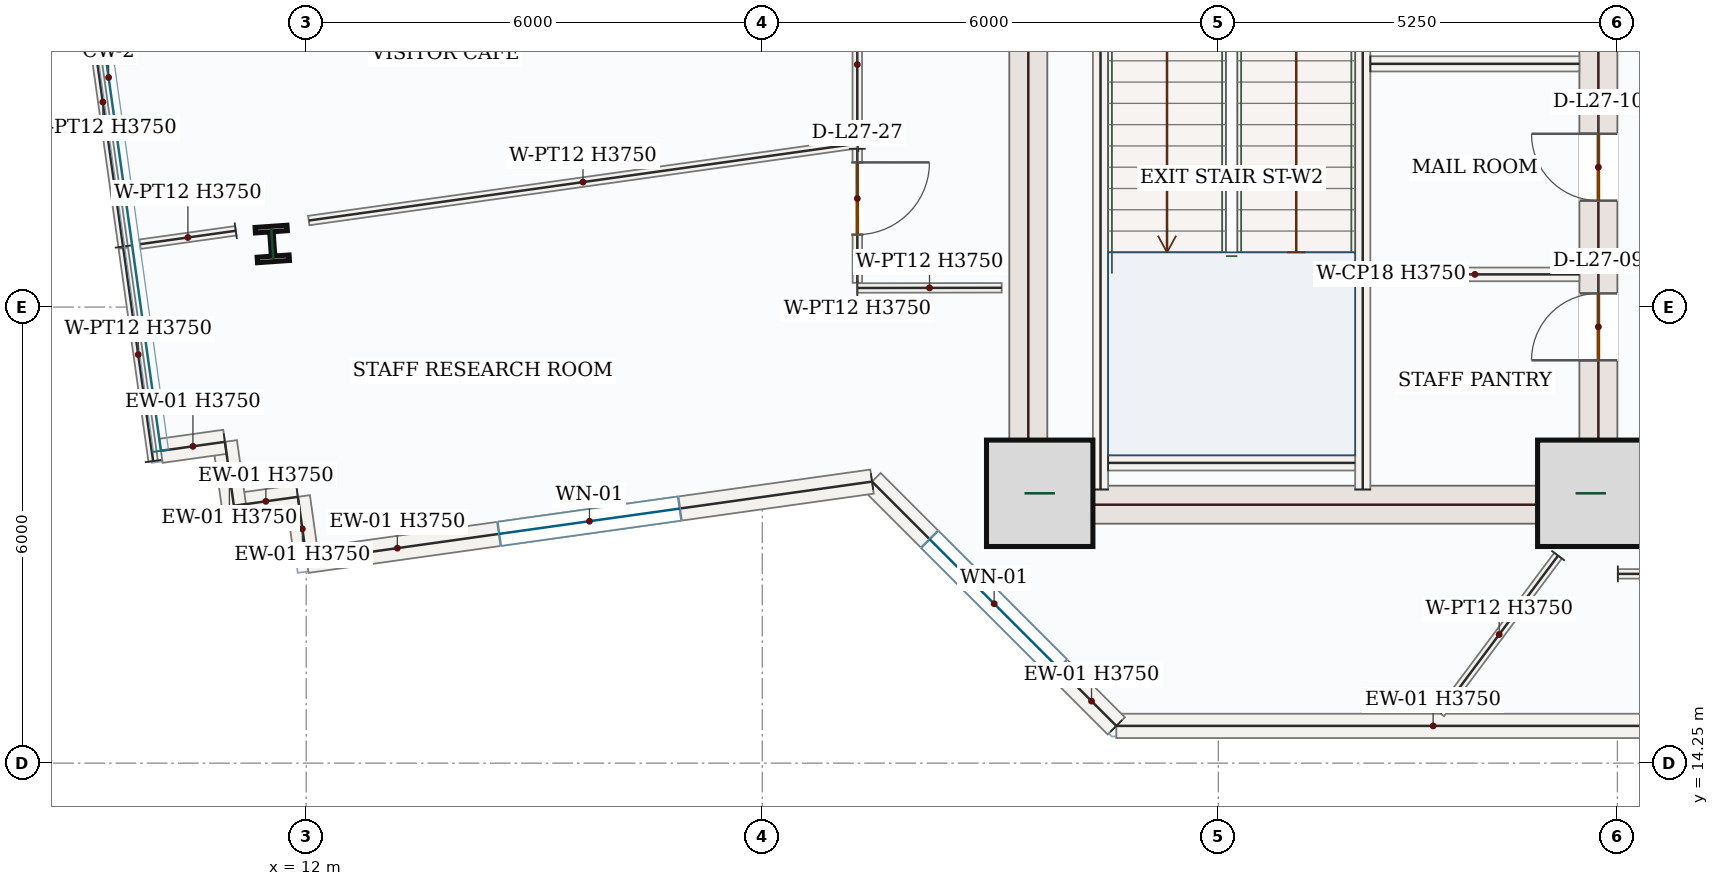
"""IFC4 building model, lengths in metres.
Left out: names, types, materials, properties, quantities, classifications, styles, units other than length and angle.
Written with IfcOpenShell. Run it as: python <this file> out.ifc"""

import sys

from ifc_helpers import new_model, si_unit, direction, frame, frame_2d, origin, origin_2d, place, context, subcontext, project, spatial, rectangle, i_section, extrude, source, transform, mapped, element, fill, save


model = new_model("IFC4")
c1 = context("Model", 3, precision=1e-05, world=origin(), true_north=direction((0.0, 1.0)))
c2 = subcontext(c1, "Body", "Model", "MODEL_VIEW")
j1 = project(units=[si_unit("LENGTHUNIT", "METRE"), si_unit("PLANEANGLEUNIT", "RADIAN")], contexts=[c1])
p1 = place(None, origin())
s1 = spatial("IfcSite", under=j1, at=p1, CompositionType="ELEMENT")
p2 = place(p1, origin())
s2 = spatial("IfcBuilding", under=s1, at=p2, CompositionType="ELEMENT")
p3 = place(p2, frame((0.0, 0.0, 121.5)))
s3 = spatial("IfcBuildingStorey", under=s2, at=p3, CompositionType="ELEMENT", Elevation=121.5)
m1 = source(origin(), c2, "Body", "SweptSolid", [
    extrude(rectangle(XDim=8.55, YDim=0.5, at=frame_2d((4.275, 0.0))), origin(), (0.0, 0.0, 1.0), 3.75),
])
p4 = place(p3, frame((21.5, 17.4, 0.0), z_axis=(0.0, 0.0, 1.0), x_axis=(0.0, 1.0, 0.0)))
e1 = element("IfcWall", 1, at=p4, inside=s3, PredefinedType="SHEAR", context=c2, shape_type="MappedRepresentation", body=[
    mapped(m1, transform((0.0, 0.0, 0.0), x_axis=(1.0, 0.0, 0.0), y_axis=(0.0, 1.0, 0.0), z_axis=(0.0, 0.0, 1.0), scale=1.0)),
])
p5 = place(p3, frame((29.0, 17.4, 0.0), z_axis=(0.0, 0.0, 1.0), x_axis=(0.0, 1.0, 0.0)))
e2 = element("IfcWall", 2, at=p5, inside=s3, PredefinedType="SHEAR", context=c2, shape_type="SweptSolid", body=[
    extrude(rectangle(XDim=8.55, YDim=0.5, at=frame_2d((4.275, 0.0))), origin(), (0.0, 0.0, 1.0), 3.75),
])
p6 = place(p5, frame((6.65, 0.0, 0.0)))
e3 = element("IfcOpeningElement", 3, at=p6, cuts=e2, PredefinedType="OPENING", context=c2, shape_type="SweptSolid", body=[
    extrude(rectangle(XDim=1.1, YDim=2.2, at=frame_2d((0.55, 1.1))), frame((0.0, 0.26, 0.0), z_axis=(0.0, -1.0, 0.0), x_axis=(1.0, 0.0, 0.0)), (0.0, 0.0, 1.0), 0.52),
])
p7 = place(p5, frame((2.15, 0.0, 0.0)))
e4 = element("IfcOpeningElement", 4, at=p7, cuts=e2, PredefinedType="OPENING", context=c2, shape_type="SweptSolid", body=[
    extrude(rectangle(XDim=0.88, YDim=2.1, at=frame_2d((0.44, 1.05))), frame((0.0, 0.26, 0.0), z_axis=(0.0, -1.0, 0.0), x_axis=(1.0, 0.0, 0.0)), (0.0, 0.0, 1.0), 0.52),
])
p8 = place(p5, frame((4.25, 0.0, 0.0)))
e5 = element("IfcOpeningElement", 5, at=p8, cuts=e2, PredefinedType="OPENING", context=c2, shape_type="SweptSolid", body=[
    extrude(rectangle(XDim=0.88, YDim=2.1, at=frame_2d((0.44, 1.05))), frame((0.0, 0.26, 0.0), z_axis=(0.0, -1.0, 0.0), x_axis=(1.0, 0.0, 0.0)), (0.0, 0.0, 1.0), 0.52),
])
m2 = source(origin(), c2, "Body", "SweptSolid", [
    extrude(rectangle(XDim=7.0, YDim=0.5, at=frame_2d((3.5, 0.0))), origin(), (0.0, 0.0, 1.0), 3.75),
])
p9 = place(p3, frame((21.75, 17.65, 0.0), z_axis=(0.0, 0.0, 1.0), x_axis=(1.0, 0.0, 0.0)))
e6 = element("IfcWall", 6, at=p9, inside=s3, PredefinedType="SHEAR", context=c2, shape_type="MappedRepresentation", body=[
    mapped(m2, transform((0.0, 0.0, 0.0), x_axis=(1.0, 0.0, 0.0), y_axis=(0.0, 1.0, 0.0), z_axis=(0.0, 0.0, 1.0), scale=1.0)),
])
m3 = source(origin(), c2, "Body", "SweptSolid", [
    extrude(rectangle(XDim=1.4, YDim=1.4, at=origin_2d()), origin(), (0.0, 0.0, 1.0), 4.2),
])
for number, where, z_axis, x_axis in (
    (7, (21.65, 17.8, 0.0), (0.0, 0.0, 1.0), (1.0, 0.0, 0.0)),
    (8, (28.9, 17.8, 0.0), (0.0, 0.0, 1.0), (1.0, 0.0, 0.0)),
):
    element("IfcColumn", number, at=place(p3, frame(where, z_axis=z_axis, x_axis=x_axis)), inside=s3, PredefinedType="COLUMN", context=c2, shape_type="MappedRepresentation", body=[
        mapped(m3, transform((0.0, 0.0, 0.0), x_axis=(1.0, 0.0, 0.0), y_axis=(0.0, 1.0, 0.0), z_axis=(0.0, 0.0, 1.0), scale=1.0)),
    ])
m4 = source(origin(), c2, "Body", "SweptSolid", [
    extrude(i_section(OverallWidth=0.421, OverallDepth=0.465, WebThickness=0.045, FlangeThickness=0.073, FilletRadius=0.018, at=origin_2d()), origin(), (0.0, 0.0, 1.0), 4.2),
])
p10 = place(p3, frame((11.553, 21.08, 0.0), z_axis=(0.0, 0.0, 1.0), x_axis=(0.99756405026, 0.069756473744, 0.0)))
e9 = element("IfcColumn", 9, at=p10, inside=s3, PredefinedType="COLUMN", context=c2, shape_type="MappedRepresentation", body=[
    mapped(m4, transform((0.0, 0.0, 0.0), x_axis=(1.0, 0.0, 0.0), y_axis=(0.0, 1.0, 0.0), z_axis=(0.0, 0.0, 1.0), scale=1.0)),
])
m5 = source(origin(), c2, "Body", "SweptSolid", [
    extrude(rectangle(XDim=8.335, YDim=0.32, at=frame_2d((4.168, 0.0))), origin(), (0.0, 0.0, 1.0), 3.75),
])
p11 = place(p3, frame((30.993, 14.74, 0.0), z_axis=(0.0, 0.0, 1.0), x_axis=(-1.0, 0.0, 0.0)))
e10 = element("IfcWall", 10, at=p11, inside=s3, PredefinedType="SOLIDWALL", context=c2, shape_type="MappedRepresentation", body=[
    mapped(m5, transform((0.0, 0.0, 0.0), x_axis=(1.0, 0.0, 0.0), y_axis=(0.0, 1.0, 0.0), z_axis=(0.0, 0.0, 1.0), scale=1.0)),
])
p12 = place(p3, frame((22.658, 14.74, 0.0), z_axis=(0.0, 0.0, 1.0), x_axis=(-0.707106781187, 0.707106781187, 0.0)))
e11 = element("IfcWall", 11, at=p12, inside=s3, PredefinedType="SOLIDWALL", context=c2, shape_type="SweptSolid", body=[
    extrude(rectangle(XDim=4.545, YDim=0.32, at=frame_2d((2.272, 0.0))), origin(), (0.0, 0.0, 1.0), 3.75),
])
p13 = place(p12, frame((1.073, 0.0, 0.85)))
e12 = element("IfcOpeningElement", 12, at=p13, cuts=e11, PredefinedType="OPENING", context=c2, shape_type="SweptSolid", body=[
    extrude(rectangle(XDim=2.4, YDim=1.8, at=frame_2d((1.2, 0.9))), frame((0.0, 0.17, 0.0), z_axis=(0.0, -1.0, 0.0), x_axis=(1.0, 0.0, 0.0)), (0.0, 0.0, 1.0), 0.34),
])
p14 = place(p3, frame((19.444, 17.954, 0.0), z_axis=(0.0, 0.0, 1.0), x_axis=(-0.990319321248, -0.138807931917, 0.0)))
e13 = element("IfcWall", 13, at=p14, inside=s3, PredefinedType="SOLIDWALL", context=c2, shape_type="SweptSolid", body=[
    extrude(rectangle(XDim=7.509, YDim=0.32, at=frame_2d((3.754, 0.0))), origin(), (0.0, 0.0, 1.0), 3.75),
])
p15 = place(p14, frame((2.554, 0.0, 0.85)))
e14 = element("IfcOpeningElement", 14, at=p15, cuts=e13, PredefinedType="OPENING", context=c2, shape_type="SweptSolid", body=[
    extrude(rectangle(XDim=2.4, YDim=1.8, at=frame_2d((1.2, 0.9))), frame((0.0, 0.17, 0.0), z_axis=(0.0, -1.0, 0.0), x_axis=(1.0, 0.0, 0.0)), (0.0, 0.0, 1.0), 0.34),
])
m6 = source(origin(), c2, "Body", "SweptSolid", [
    extrude(rectangle(XDim=0.85, YDim=0.32, at=frame_2d((0.425, 0.0))), origin(), (0.0, 0.0, 1.0), 3.75),
])
for number, where, z_axis, x_axis in (
    (15, (12.008, 16.912, 0.0), (0.0, 0.0, 1.0), (-0.139, 0.99, 0.0)),
    (16, (11.89, 17.753, 0.0), (0.0, 0.0, 1.0), (-0.99, -0.139, 0.0)),
):
    element("IfcWall", number, at=place(p3, frame(where, z_axis=z_axis, x_axis=x_axis)), inside=s3, PredefinedType="SOLIDWALL", context=c2, shape_type="MappedRepresentation", body=[
        mapped(m6, transform((0.0, 0.0, 0.0), x_axis=(1.0, 0.0, 0.0), y_axis=(0.0, 1.0, 0.0), z_axis=(0.0, 0.0, 1.0), scale=1.0)),
    ])
m7 = source(origin(), c2, "Body", "SweptSolid", [
    extrude(rectangle(XDim=0.85, YDim=0.32, at=frame_2d((0.425, 0.0))), origin(), (0.0, 0.0, 1.0), 3.75),
])
p16 = place(p3, frame((11.048, 17.635, 0.0), z_axis=(0.0, 0.0, 1.0), x_axis=(-0.138766190202, 0.990325171071, 0.0)))
e17 = element("IfcWall", 17, at=p16, inside=s3, PredefinedType="SOLIDWALL", context=c2, shape_type="MappedRepresentation", body=[
    mapped(m7, transform((0.0, 0.0, 0.0), x_axis=(1.0, 0.0, 0.0), y_axis=(0.0, 1.0, 0.0), z_axis=(0.0, 0.0, 1.0), scale=1.0)),
])
p17 = place(p3, frame((10.93, 18.477, 0.0), z_axis=(0.0, 0.0, 1.0), x_axis=(-0.990330700987, -0.138726719425, 0.0)))
e18 = element("IfcWall", 18, at=p17, inside=s3, PredefinedType="SOLIDWALL", context=c2, shape_type="MappedRepresentation", body=[
    mapped(m6, transform((0.0, 0.0, 0.0), x_axis=(1.0, 0.0, 0.0), y_axis=(0.0, 1.0, 0.0), z_axis=(0.0, 0.0, 1.0), scale=1.0)),
])
m8 = source(origin(), c2, "Body", "SweptSolid", [
    extrude(rectangle(XDim=7.87, YDim=0.2, at=frame_2d((3.935, 0.0))), origin(), (0.0, 0.0, 1.0), 3.75),
])
p18 = place(p3, frame((22.45, 17.85, 0.0), z_axis=(0.0, 0.0, 1.0), x_axis=(0.0, 1.0, 0.0)))
e19 = element("IfcWall", 19, at=p18, inside=s3, PredefinedType="SOLIDWALL", context=c2, shape_type="MappedRepresentation", body=[
    mapped(m8, transform((0.0, 0.0, 0.0), x_axis=(1.0, 0.0, 0.0), y_axis=(0.0, 1.0, 0.0), z_axis=(0.0, 0.0, 1.0), scale=1.0)),
])
p19 = place(p3, frame((25.9, 17.85, 0.0), z_axis=(0.0, 0.0, 1.0), x_axis=(0.0, 1.0, 0.0)))
e20 = element("IfcWall", 20, at=p19, inside=s3, PredefinedType="SOLIDWALL", context=c2, shape_type="SweptSolid", body=[
    extrude(rectangle(XDim=8.0, YDim=0.2, at=frame_2d((4.0, 0.0))), origin(), (0.0, 0.0, 1.0), 3.75),
])
p20 = place(p19, frame((6.3, 0.0, 0.0)))
e21 = element("IfcOpeningElement", 21, at=p20, cuts=e20, PredefinedType="OPENING", context=c2, shape_type="SweptSolid", body=[
    extrude(rectangle(XDim=1.05, YDim=2.15, at=frame_2d((0.525, 1.075))), frame((0.0, 0.11, 0.0), z_axis=(0.0, -1.0, 0.0), x_axis=(1.0, 0.0, 0.0)), (0.0, 0.0, 1.0), 0.22),
])
m9 = source(origin(), c2, "Body", "SweptSolid", [
    extrude(rectangle(XDim=3.25, YDim=0.2, at=frame_2d((1.625, 0.0))), origin(), (0.0, 0.0, 1.0), 3.75),
])
p21 = place(p3, frame((22.55, 18.2, 0.0), z_axis=(0.0, 0.0, 1.0), x_axis=(1.0, 0.0, 0.0)))
e22 = element("IfcWall", 22, at=p21, inside=s3, PredefinedType="SOLIDWALL", context=c2, shape_type="MappedRepresentation", body=[
    mapped(m9, transform((0.0, 0.0, 0.0), x_axis=(1.0, 0.0, 0.0), y_axis=(0.0, 1.0, 0.0), z_axis=(0.0, 0.0, 1.0), scale=1.0)),
])
m10 = source(origin(), c2, "Body", "SweptSolid", [
    extrude(rectangle(XDim=2.75, YDim=0.2, at=frame_2d((1.375, 0.0))), origin(), (0.0, 0.0, 1.0), 3.75),
])
p22 = place(p3, frame((26.0, 23.45, 0.0), z_axis=(0.0, 0.0, 1.0), x_axis=(1.0, 0.0, 0.0)))
e23 = element("IfcWall", 23, at=p22, inside=s3, PredefinedType="SOLIDWALL", context=c2, shape_type="MappedRepresentation", body=[
    mapped(m10, transform((0.0, 0.0, 0.0), x_axis=(1.0, 0.0, 0.0), y_axis=(0.0, 1.0, 0.0), z_axis=(0.0, 0.0, 1.0), scale=1.0)),
])
m11 = source(origin(), c2, "Body", "SweptSolid", [
    extrude(rectangle(XDim=2.75, YDim=0.18, at=frame_2d((1.375, 0.0))), origin(), (0.0, 0.0, 1.0), 3.75),
])
p23 = place(p3, frame((26.0, 20.68, 0.0), z_axis=(0.0, 0.0, 1.0), x_axis=(1.0, 0.0, 0.0)))
e24 = element("IfcWall", 24, at=p23, inside=s3, PredefinedType="PARTITIONING", context=c2, shape_type="MappedRepresentation", body=[
    mapped(m11, transform((0.0, 0.0, 0.0), x_axis=(1.0, 0.0, 0.0), y_axis=(0.0, 1.0, 0.0), z_axis=(0.0, 0.0, 1.0), scale=1.0)),
])
m12 = source(origin(), c2, "Body", "SweptSolid", [
    extrude(rectangle(XDim=1.272, YDim=0.125, at=frame_2d((0.636, 0.0))), origin(), (0.0, 0.0, 1.0), 3.75),
])
p24 = place(p3, frame((11.073, 21.254, 0.0), z_axis=(0.0, 0.0, 1.0), x_axis=(-0.990325928558, -0.138760784176, 0.0)))
e25 = element("IfcWall", 25, at=p24, inside=s3, PredefinedType="PARTITIONING", context=c2, shape_type="MappedRepresentation", body=[
    mapped(m12, transform((0.0, 0.0, 0.0), x_axis=(1.0, 0.0, 0.0), y_axis=(0.0, 1.0, 0.0), z_axis=(0.0, 0.0, 1.0), scale=1.0)),
])
m13 = source(origin(), c2, "Body", "SweptSolid", [
    extrude(rectangle(XDim=3.84, YDim=0.125, at=frame_2d((1.92, 0.0))), origin(), (0.0, 0.0, 1.0), 3.75),
])
p25 = place(p3, frame((9.591, 21.046, 0.0), z_axis=(0.0, 0.0, 1.0), x_axis=(-0.138795007241, 0.990321132747, 0.0)))
e26 = element("IfcWall", 26, at=p25, inside=s3, PredefinedType="PARTITIONING", context=c2, shape_type="MappedRepresentation", body=[
    mapped(m13, transform((0.0, 0.0, 0.0), x_axis=(1.0, 0.0, 0.0), y_axis=(0.0, 1.0, 0.0), z_axis=(0.0, 0.0, 1.0), scale=1.0)),
])
p26 = place(p3, frame((19.25, 26.209, 0.0), z_axis=(0.0, 0.0, 1.0), x_axis=(0.0, -1.0, 0.0)))
e27 = element("IfcWall", 27, at=p26, inside=s3, PredefinedType="PARTITIONING", context=c2, shape_type="SweptSolid", body=[
    extrude(rectangle(XDim=3.809, YDim=0.125, at=frame_2d((1.905, 0.0))), origin(), (0.0, 0.0, 1.0), 3.75),
])
p27 = place(p26, frame((0.629, 0.0, 0.0)))
e28 = element("IfcOpeningElement", 28, at=p27, cuts=e27, PredefinedType="OPENING", context=c2, shape_type="SweptSolid", body=[
    extrude(rectangle(XDim=0.95, YDim=2.15, at=frame_2d((0.475, 1.075))), frame((0.0, 0.073, 0.0), z_axis=(0.0, -1.0, 0.0), x_axis=(1.0, 0.0, 0.0)), (0.0, 0.0, 1.0), 0.145),
])
m14 = source(origin(), c2, "Body", "SweptSolid", [
    extrude(rectangle(XDim=7.287, YDim=0.125, at=frame_2d((3.644, 0.0))), origin(), (0.0, 0.0, 1.0), 3.75),
])
p28 = place(p3, frame((19.25, 22.4, 0.0), z_axis=(0.0, 0.0, 1.0), x_axis=(-0.990314677425, -0.138841059045, 0.0)))
e29 = element("IfcWall", 29, at=p28, inside=s3, PredefinedType="PARTITIONING", context=c2, shape_type="MappedRepresentation", body=[
    mapped(m14, transform((0.0, 0.0, 0.0), x_axis=(1.0, 0.0, 0.0), y_axis=(0.0, 1.0, 0.0), z_axis=(0.0, 0.0, 1.0), scale=1.0)),
])
m15 = source(origin(), c2, "Body", "SweptSolid", [
    extrude(rectangle(XDim=1.898, YDim=0.125, at=frame_2d((0.949, 0.0))), origin(), (0.0, 0.0, 1.0), 3.75),
])
p29 = place(p3, frame((19.251, 20.501, 0.0), z_axis=(0.0, 0.0, 1.0), x_axis=(0.999998999442, 0.001414607638, 0.0)))
e30 = element("IfcWall", 30, at=p29, inside=s3, PredefinedType="PARTITIONING", context=c2, shape_type="MappedRepresentation", body=[
    mapped(m15, transform((0.0, 0.0, 0.0), x_axis=(1.0, 0.0, 0.0), y_axis=(0.0, 1.0, 0.0), z_axis=(0.0, 0.0, 1.0), scale=1.0)),
])
m16 = source(origin(), c2, "Body", "SweptSolid", [
    extrude(rectangle(XDim=2.59, YDim=0.125, at=frame_2d((1.295, 0.0))), origin(), (0.0, 0.0, 1.0), 3.75),
])
p30 = place(p3, frame((28.47, 16.98, 0.0), z_axis=(0.0, 0.0, 1.0), x_axis=(-0.598354601134, -0.801231409333, 0.0)))
e31 = element("IfcWall", 31, at=p30, inside=s3, PredefinedType="PARTITIONING", context=c2, shape_type="MappedRepresentation", body=[
    mapped(m16, transform((0.0, 0.0, 0.0), x_axis=(1.0, 0.0, 0.0), y_axis=(0.0, 1.0, 0.0), z_axis=(0.0, 0.0, 1.0), scale=1.0)),
])
m17 = source(origin(), c2, "Body", "SweptSolid", [
    extrude(rectangle(XDim=2.83, YDim=0.125, at=frame_2d((1.415, 0.0))), origin(), (0.0, 0.0, 1.0), 3.75),
])
p31 = place(p3, frame((9.987, 18.224, 0.0), z_axis=(0.0, 0.0, 1.0), x_axis=(-0.138811993372, 0.990318751966, 0.0)))
e32 = element("IfcWall", 32, at=p31, inside=s3, PredefinedType="PARTITIONING", context=c2, shape_type="MappedRepresentation", body=[
    mapped(m17, transform((0.0, 0.0, 0.0), x_axis=(1.0, 0.0, 0.0), y_axis=(0.0, 1.0, 0.0), z_axis=(0.0, 0.0, 1.0), scale=1.0)),
])
p32 = place(p3, frame((19.25, 22.332, 0.0), z_axis=(0.0, 0.0, 1.0), x_axis=(0.00055378643, -0.99999984666, 0.0)))
e33 = element("IfcWall", 33, at=p32, inside=s3, PredefinedType="PARTITIONING", context=c2, shape_type="SweptSolid", body=[
    extrude(rectangle(XDim=1.763, YDim=0.125, at=frame_2d((0.882, 0.0))), origin(), (0.0, 0.0, 1.0), 3.75),
])
p33 = place(p32, frame((0.179, 0.0, 0.0)))
e34 = element("IfcOpeningElement", 34, at=p33, cuts=e33, PredefinedType="OPENING", context=c2, shape_type="SweptSolid", body=[
    extrude(rectangle(XDim=0.95, YDim=2.15, at=frame_2d((0.475, 1.075))), frame((0.0, 0.073, 0.0), z_axis=(0.0, -1.0, 0.0), x_axis=(1.0, 0.0, 0.0)), (0.0, 0.0, 1.0), 0.145),
])
p34 = place(p3, frame((29.256, 16.74, 0.0), z_axis=(0.0, 0.0, 1.0), x_axis=(1.0, 0.0, 0.0)))
e35 = element("IfcWall", 35, at=p34, inside=s3, PredefinedType="PARTITIONING", context=c2, shape_type="SweptSolid", body=[
    extrude(rectangle(XDim=13.488, YDim=0.125, at=frame_2d((6.744, 0.0))), origin(), (0.0, 0.0, 1.0), 3.75),
])
p35 = place(p34, frame((6.269, 0.0, 0.0)))
e36 = element("IfcOpeningElement", 36, at=p35, cuts=e35, PredefinedType="OPENING", context=c2, shape_type="SweptSolid", body=[
    extrude(rectangle(XDim=0.95, YDim=2.15, at=frame_2d((0.475, 1.075))), frame((0.0, 0.073, 0.0), z_axis=(0.0, -1.0, 0.0), x_axis=(1.0, 0.0, 0.0)), (0.0, 0.0, 1.0), 0.145),
])
m18 = source(origin(), c2, "Body", "SweptSolid", [
    extrude(rectangle(XDim=2.4, YDim=1.8, at=frame_2d((1.2, 0.9))), frame((0.0, 0.03, 0.0), z_axis=(0.0, -1.0, 0.0), x_axis=(1.0, 0.0, 0.0)), (0.0, 0.0, 1.0), 0.06),
])
p36 = place(p13, origin())
e37 = element("IfcWindow", 37, at=p36, inside=s3, PartitioningType="DOUBLE_PANEL_VERTICAL", PredefinedType="WINDOW", context=c2, shape_type="MappedRepresentation", body=[
    mapped(m18, transform((0.0, 0.0, 0.0), x_axis=(1.0, 0.0, 0.0), y_axis=(0.0, 1.0, 0.0), z_axis=(0.0, 0.0, 1.0), scale=1.0)),
])
fill(e12, e37)
p37 = place(p15, origin())
e38 = element("IfcWindow", 38, at=p37, inside=s3, PartitioningType="DOUBLE_PANEL_VERTICAL", PredefinedType="WINDOW", context=c2, shape_type="MappedRepresentation", body=[
    mapped(m18, transform((0.0, 0.0, 0.0), x_axis=(1.0, 0.0, 0.0), y_axis=(0.0, 1.0, 0.0), z_axis=(0.0, 0.0, 1.0), scale=1.0)),
])
fill(e14, e38)
m19 = source(origin(), c2, "Body", "SweptSolid", [
    extrude(rectangle(XDim=0.88, YDim=2.1, at=frame_2d((0.44, 1.05))), frame((0.0, 0.025, 0.0), z_axis=(0.0, -1.0, 0.0), x_axis=(1.0, 0.0, 0.0)), (0.0, 0.0, 1.0), 0.05),
])
p38 = place(p7, origin())
e39 = element("IfcDoor", 39, at=p38, inside=s3, OperationType="SINGLE_SWING_LEFT", PredefinedType="DOOR", context=c2, shape_type="MappedRepresentation", body=[
    mapped(m19, transform((0.0, 0.0, 0.0), x_axis=(1.0, 0.0, 0.0), y_axis=(0.0, 1.0, 0.0), z_axis=(0.0, 0.0, 1.0), scale=1.0)),
])
fill(e4, e39)
p39 = place(p8, origin())
e40 = element("IfcDoor", 40, at=p39, inside=s3, OperationType="SINGLE_SWING_RIGHT", PredefinedType="DOOR", context=c2, shape_type="MappedRepresentation", body=[
    mapped(m19, transform((0.0, 0.0, 0.0), x_axis=(1.0, 0.0, 0.0), y_axis=(0.0, 1.0, 0.0), z_axis=(0.0, 0.0, 1.0), scale=1.0)),
])
fill(e5, e40)
m20 = source(origin(), c2, "Body", "SweptSolid", [
    extrude(rectangle(XDim=0.95, YDim=2.15, at=frame_2d((0.475, 1.075))), frame((0.0, 0.025, 0.0), z_axis=(0.0, -1.0, 0.0), x_axis=(1.0, 0.0, 0.0)), (0.0, 0.0, 1.0), 0.05),
])
p40 = place(p33, origin())
e41 = element("IfcDoor", 41, at=p40, inside=s3, OperationType="SINGLE_SWING_LEFT", PredefinedType="DOOR", context=c2, shape_type="MappedRepresentation", body=[
    mapped(m20, transform((0.0, 0.0, 0.0), x_axis=(1.0, 0.0, 0.0), y_axis=(0.0, 1.0, 0.0), z_axis=(0.0, 0.0, 1.0), scale=1.0)),
])
fill(e34, e41)
save(model, sys.argv[1])
